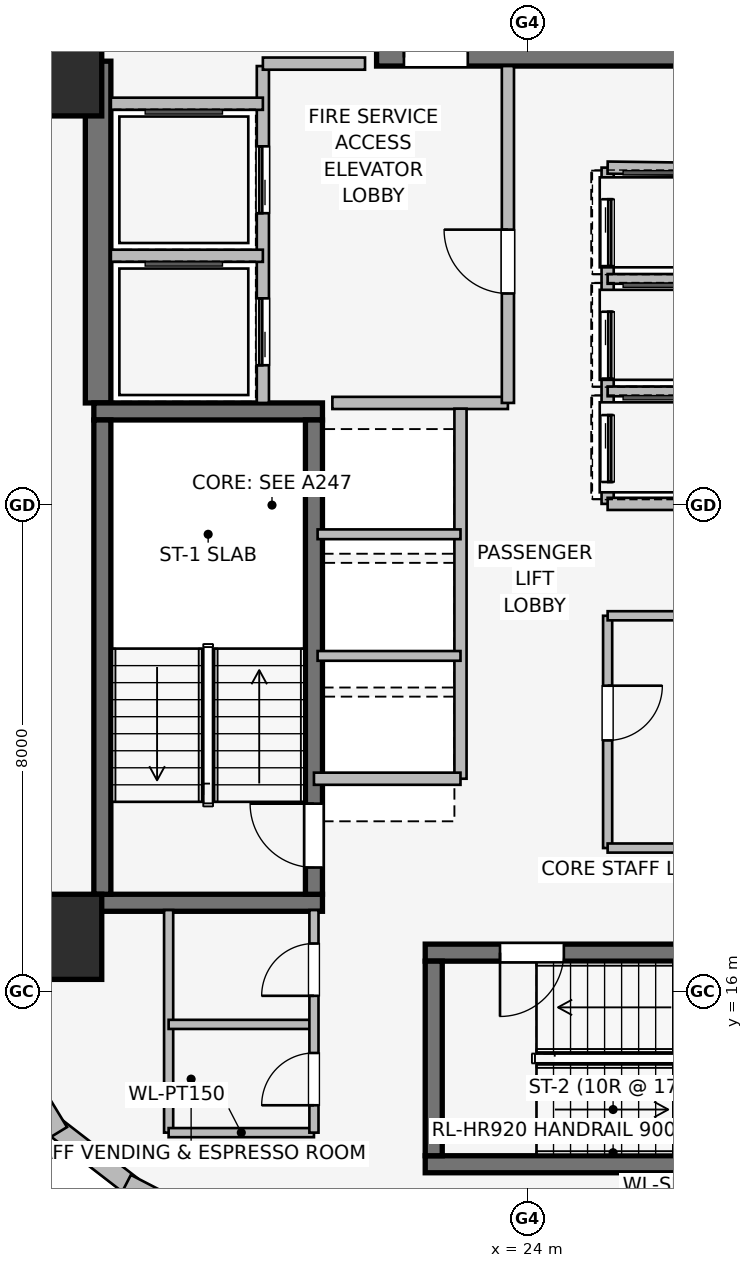
"""IFC4 building model, lengths in metres.
Left out: names, types, materials, properties, quantities, classifications, styles, units other than length and angle.
Written with IfcOpenShell. Run it as: python <this file> out.ifc"""

import sys

from ifc_helpers import new_model, si_unit, direction, frame, frame_2d, origin, origin_2d, place, context, subcontext, project, spatial, rectangle, extrude, element, fill, save


model = new_model("IFC4")
c1 = context("Model", 3, precision=1e-05, world=origin(), true_north=direction((0.0, 1.0)))
c2 = subcontext(c1, "Body", "Model", "MODEL_VIEW")
j1 = project(units=[si_unit("LENGTHUNIT", "METRE"), si_unit("PLANEANGLEUNIT", "RADIAN")], contexts=[c1])
p1 = place(None, origin())
s1 = spatial("IfcSite", under=j1, at=p1, CompositionType="ELEMENT")
p2 = place(p1, origin())
s2 = spatial("IfcBuilding", under=s1, at=p2, CompositionType="ELEMENT")
p3 = place(p2, frame((0.0, 0.0, 167.1)))
s3 = spatial("IfcBuildingStorey", under=s2, at=p3, CompositionType="ELEMENT", Elevation=167.1)
p4 = place(p3, frame((16.94, 25.68, 0.0), z_axis=(0.0, 0.0, 1.0), x_axis=(0.0, 1.0, 0.0)))
e1 = element("IfcWall", 1, at=p4, inside=s3, PredefinedType="SHEAR", context=c2, shape_type="SweptSolid", body=[
    extrude(rectangle(XDim=5.62, YDim=0.42, at=frame_2d((2.81, 0.0))), origin(), (0.0, 0.0, 1.0), 3.45),
])
for number, where, z_axis, x_axis in (
    (2, (16.87, 17.46, 0.0), (0.0, 0.0, 1.0), (1.0, 0.0, 0.0)),
    (3, (20.63, 25.54, 0.0), (0.0, 0.0, 1.0), (-1.0, 0.0, 0.0)),
):
    element("IfcWall", number, at=place(p3, frame(where, z_axis=z_axis, x_axis=x_axis)), inside=s3, PredefinedType="SHEAR", context=c2, shape_type="SweptSolid", body=[
        extrude(rectangle(XDim=3.76, YDim=0.28, at=frame_2d((1.88, 0.0))), origin(), (0.0, 0.0, 1.0), 3.45),
    ])
p5 = place(p3, frame((17.01, 25.4, 0.0), z_axis=(0.0, 0.0, 1.0), x_axis=(0.0, -1.0, 0.0)))
e4 = element("IfcWall", 4, at=p5, inside=s3, PredefinedType="SHEAR", context=c2, shape_type="SweptSolid", body=[
    extrude(rectangle(XDim=7.8, YDim=0.28, at=frame_2d((3.9, 0.0))), origin(), (0.0, 0.0, 1.0), 3.45),
])
p6 = place(p3, frame((20.49, 17.6, 0.0), z_axis=(0.0, 0.0, 1.0), x_axis=(0.0, 1.0, 0.0)))
e5 = element("IfcWall", 5, at=p6, inside=s3, PredefinedType="SHEAR", context=c2, shape_type="SweptSolid", body=[
    extrude(rectangle(XDim=7.8, YDim=0.28, at=frame_2d((3.9, 0.0))), origin(), (0.0, 0.0, 1.0), 3.45),
])
p7 = place(p6, frame((0.44, 0.0, 0.0)))
e6 = element("IfcOpeningElement", 6, at=p7, cuts=e5, PredefinedType="OPENING", context=c2, shape_type="SweptSolid", body=[
    extrude(rectangle(XDim=1.05, YDim=2.0, at=frame_2d((0.525, 1.0))), frame((0.0, 0.15, 0.0), z_axis=(0.0, -1.0, 0.0), x_axis=(1.0, 0.0, 0.0)), (0.0, 0.0, 1.0), 0.3),
])
p8 = place(p3, frame((22.32, 13.16, 0.0), z_axis=(0.0, 0.0, 1.0), x_axis=(1.0, 0.0, 0.0)))
e7 = element("IfcWall", 7, at=p8, inside=s3, PredefinedType="SHEAR", context=c2, shape_type="SweptSolid", body=[
    extrude(rectangle(XDim=8.36, YDim=0.28, at=frame_2d((4.18, 0.0))), origin(), (0.0, 0.0, 1.0), 3.45),
])
p9 = place(p3, frame((30.68, 16.64, 0.0), z_axis=(0.0, 0.0, 1.0), x_axis=(-1.0, 0.0, 0.0)))
e8 = element("IfcWall", 8, at=p9, inside=s3, PredefinedType="SHEAR", context=c2, shape_type="SweptSolid", body=[
    extrude(rectangle(XDim=8.36, YDim=0.28, at=frame_2d((4.18, 0.0))), origin(), (0.0, 0.0, 1.0), 3.45),
])
p10 = place(p9, frame((6.08, 0.0, 0.0)))
e9 = element("IfcOpeningElement", 9, at=p10, cuts=e8, PredefinedType="OPENING", context=c2, shape_type="SweptSolid", body=[
    extrude(rectangle(XDim=1.05, YDim=2.0, at=frame_2d((0.525, 1.0))), frame((0.0, 0.15, 0.0), z_axis=(0.0, -1.0, 0.0), x_axis=(1.0, 0.0, 0.0)), (0.0, 0.0, 1.0), 0.3),
])
p11 = place(p3, frame((22.46, 16.5, 0.0), z_axis=(0.0, 0.0, 1.0), x_axis=(0.0, -1.0, 0.0)))
e10 = element("IfcWall", 10, at=p11, inside=s3, PredefinedType="SHEAR", context=c2, shape_type="SweptSolid", body=[
    extrude(rectangle(XDim=3.2, YDim=0.28, at=frame_2d((1.6, 0.0))), origin(), (0.0, 0.0, 1.0), 3.45),
])
p12 = place(p3, frame((21.52, 31.36, 0.0), z_axis=(0.0, 0.0, 1.0), x_axis=(1.0, 0.0, 0.0)))
e11 = element("IfcWall", 11, at=p12, inside=s3, PredefinedType="SHEAR", context=c2, shape_type="SweptSolid", body=[
    extrude(rectangle(XDim=8.36, YDim=0.28, at=frame_2d((4.18, 0.0))), origin(), (0.0, 0.0, 1.0), 3.45),
])
p13 = place(p12, frame((0.45, 0.0, 0.0)))
e12 = element("IfcOpeningElement", 12, at=p13, cuts=e11, PredefinedType="OPENING", context=c2, shape_type="SweptSolid", body=[
    extrude(rectangle(XDim=1.05, YDim=2.0, at=frame_2d((0.525, 1.0))), frame((0.0, 0.15, 0.0), z_axis=(0.0, -1.0, 0.0), x_axis=(1.0, 0.0, 0.0)), (0.0, 0.0, 1.0), 0.3),
])
for number, where, z_axis, x_axis in (
    (13, (16.3, 16.9, 0.0), (0.0, 0.0, 1.0), (1.0, 0.0, 0.0)),
    (14, (16.3, 31.1, 0.0), (0.0, 0.0, 1.0), (1.0, 0.0, 0.0)),
):
    element("IfcColumn", number, at=place(p3, frame(where, z_axis=z_axis, x_axis=x_axis)), inside=s3, PredefinedType="COLUMN", context=c2, shape_type="SweptSolid", body=[
        extrude(rectangle(XDim=1.4, YDim=1.4, at=origin_2d()), origin(), (0.0, 0.0, 1.0), 3.45),
    ])
p14 = place(p3, frame((17.489, 12.8, 0.0), z_axis=(0.0, 0.0, 1.0), x_axis=(-0.791409877269, 0.611285862884, 0.0)))
e15 = element("IfcWall", 15, at=p14, inside=s3, PredefinedType="STANDARD", context=c2, shape_type="SweptSolid", body=[
    extrude(rectangle(XDim=1.677, YDim=0.33, at=frame_2d((0.838, 0.0))), origin(), (0.0, 0.0, 1.0), 3.19),
])
p15 = place(p3, frame((16.288, 13.685, 0.0), z_axis=(0.0, 0.0, 1.0), x_axis=(-0.520325409202, 0.853968072318, 0.0)))
e16 = element("IfcWall", 16, at=p15, inside=s3, PredefinedType="STANDARD", context=c2, shape_type="SweptSolid", body=[
    extrude(rectangle(XDim=1.678, YDim=0.33, at=frame_2d((0.839, 0.0))), origin(), (0.0, 0.0, 1.0), 3.19),
])
p16 = place(p3, frame((32.362, 5.129, 0.0), z_axis=(0.0, 0.0, 1.0), x_axis=(-0.888626188278, 0.458632202867, 0.0)))
e17 = element("IfcWall", 17, at=p16, inside=s3, PredefinedType="STANDARD", context=c2, shape_type="SweptSolid", body=[
    extrude(rectangle(XDim=16.828, YDim=0.31, at=frame_2d((8.414, 0.0))), origin(), (0.0, 0.0, 1.0), 3.19),
])
p17 = place(p16, frame((1.137, 0.0, 0.75)))
e18 = element("IfcOpeningElement", 18, at=p17, cuts=e17, PredefinedType="OPENING", context=c2, shape_type="SweptSolid", body=[
    extrude(rectangle(XDim=1.05, YDim=1.4, at=frame_2d((0.525, 0.7))), frame((0.0, 0.165, 0.0), z_axis=(0.0, -1.0, 0.0), x_axis=(1.0, 0.0, 0.0)), (0.0, 0.0, 1.0), 0.33),
])
p18 = place(p16, frame((4.768, 0.0, 0.75)))
e19 = element("IfcOpeningElement", 19, at=p18, cuts=e17, PredefinedType="OPENING", context=c2, shape_type="SweptSolid", body=[
    extrude(rectangle(XDim=1.35, YDim=1.45, at=frame_2d((0.675, 0.725))), frame((0.0, 0.165, 0.0), z_axis=(0.0, -1.0, 0.0), x_axis=(1.0, 0.0, 0.0)), (0.0, 0.0, 1.0), 0.33),
])
p19 = place(p16, frame((7.739, 0.0, 0.75)))
e20 = element("IfcOpeningElement", 20, at=p19, cuts=e17, PredefinedType="OPENING", context=c2, shape_type="SweptSolid", body=[
    extrude(rectangle(XDim=1.35, YDim=1.45, at=frame_2d((0.675, 0.725))), frame((0.0, 0.165, 0.0), z_axis=(0.0, -1.0, 0.0), x_axis=(1.0, 0.0, 0.0)), (0.0, 0.0, 1.0), 0.33),
])
p20 = place(p16, frame((10.71, 0.0, 0.75)))
e21 = element("IfcOpeningElement", 21, at=p20, cuts=e17, PredefinedType="OPENING", context=c2, shape_type="SweptSolid", body=[
    extrude(rectangle(XDim=1.35, YDim=1.45, at=frame_2d((0.675, 0.725))), frame((0.0, 0.165, 0.0), z_axis=(0.0, -1.0, 0.0), x_axis=(1.0, 0.0, 0.0)), (0.0, 0.0, 1.0), 0.33),
])
p21 = place(p16, frame((14.885, 0.0, 0.75)))
e22 = element("IfcOpeningElement", 22, at=p21, cuts=e17, PredefinedType="OPENING", context=c2, shape_type="SweptSolid", body=[
    extrude(rectangle(XDim=1.05, YDim=1.4, at=frame_2d((0.525, 0.7))), frame((0.0, 0.165, 0.0), z_axis=(0.0, -1.0, 0.0), x_axis=(1.0, 0.0, 0.0)), (0.0, 0.0, 1.0), 0.33),
])
p22 = place(p3, frame((19.65, 25.68, 0.0), z_axis=(0.0, 0.0, 1.0), x_axis=(0.0, 1.0, 0.0)))
e23 = element("IfcWall", 23, at=p22, inside=s3, PredefinedType="PARTITIONING", context=c2, shape_type="SweptSolid", body=[
    extrude(rectangle(XDim=5.54, YDim=0.2, at=frame_2d((2.77, 0.0))), origin(), (0.0, 0.0, 1.0), 3.19),
])
p23 = place(p22, frame((0.62, 0.0, 0.0)))
e24 = element("IfcOpeningElement", 24, at=p23, cuts=e23, PredefinedType="OPENING", context=c2, shape_type="SweptSolid", body=[
    extrude(rectangle(XDim=1.1, YDim=2.2, at=frame_2d((0.55, 1.1))), frame((0.0, 0.11, 0.0), z_axis=(0.0, -1.0, 0.0), x_axis=(1.0, 0.0, 0.0)), (0.0, 0.0, 1.0), 0.22),
])
p24 = place(p22, frame((3.12, 0.0, 0.0)))
e25 = element("IfcOpeningElement", 25, at=p24, cuts=e23, PredefinedType="OPENING", context=c2, shape_type="SweptSolid", body=[
    extrude(rectangle(XDim=1.1, YDim=2.2, at=frame_2d((0.55, 1.1))), frame((0.0, 0.11, 0.0), z_axis=(0.0, -1.0, 0.0), x_axis=(1.0, 0.0, 0.0)), (0.0, 0.0, 1.0), 0.22),
])
p25 = place(p3, frame((20.793, 25.68, 0.0), z_axis=(0.0, 0.0, 1.0), x_axis=(1.0, 0.0, 0.0)))
e26 = element("IfcWall", 26, at=p25, inside=s3, PredefinedType="PARTITIONING", context=c2, shape_type="SweptSolid", body=[
    extrude(rectangle(XDim=2.887, YDim=0.2, at=frame_2d((1.443, 0.0))), origin(), (0.0, 0.0, 1.0), 3.19),
])
p26 = place(p3, frame((23.68, 25.68, 0.0), z_axis=(0.0, 0.0, 1.0), x_axis=(0.0, 1.0, 0.0)))
e27 = element("IfcWall", 27, at=p26, inside=s3, PredefinedType="PARTITIONING", context=c2, shape_type="SweptSolid", body=[
    extrude(rectangle(XDim=5.54, YDim=0.2, at=frame_2d((2.77, 0.0))), origin(), (0.0, 0.0, 1.0), 3.19),
])
p27 = place(p26, frame((1.8, 0.0, 0.0)))
e28 = element("IfcOpeningElement", 28, at=p27, cuts=e27, PredefinedType="OPENING", context=c2, shape_type="SweptSolid", body=[
    extrude(rectangle(XDim=1.05, YDim=2.0, at=frame_2d((0.525, 1.0))), frame((0.0, 0.11, 0.0), z_axis=(0.0, -1.0, 0.0), x_axis=(1.0, 0.0, 0.0)), (0.0, 0.0, 1.0), 0.22),
])
p28 = place(p3, frame((21.33, 31.26, 0.0), z_axis=(0.0, 0.0, 1.0), x_axis=(-1.0, 0.0, 0.0)))
e29 = element("IfcWall", 29, at=p28, inside=s3, PredefinedType="PARTITIONING", context=c2, shape_type="SweptSolid", body=[
    extrude(rectangle(XDim=1.68, YDim=0.2, at=frame_2d((0.84, 0.0))), origin(), (0.0, 0.0, 1.0), 3.19),
])
p29 = place(p3, frame((17.15, 28.1, 0.0), z_axis=(0.0, 0.0, 1.0), x_axis=(1.0, 0.0, 0.0)))
e30 = element("IfcWall", 30, at=p29, inside=s3, PredefinedType="PARTITIONING", context=c2, shape_type="SweptSolid", body=[
    extrude(rectangle(XDim=2.5, YDim=0.2, at=frame_2d((1.25, 0.0))), origin(), (0.0, 0.0, 1.0), 3.19),
])
p30 = place(p3, frame((19.65, 30.6, 0.0), z_axis=(0.0, 0.0, 1.0), x_axis=(-1.0, 0.0, 0.0)))
e31 = element("IfcWall", 31, at=p30, inside=s3, PredefinedType="PARTITIONING", context=c2, shape_type="SweptSolid", body=[
    extrude(rectangle(XDim=2.5, YDim=0.2, at=frame_2d((1.25, 0.0))), origin(), (0.0, 0.0, 1.0), 2.09),
])
p31 = place(p3, frame((22.9, 19.5, 0.0), z_axis=(0.0, 0.0, 1.0), x_axis=(0.0, 1.0, 0.0)))
e32 = element("IfcWall", 32, at=p31, inside=s3, PredefinedType="PARTITIONING", context=c2, shape_type="SweptSolid", body=[
    extrude(rectangle(XDim=6.085, YDim=0.2, at=frame_2d((3.042, 0.0))), origin(), (0.0, 0.0, 1.0), 3.19),
])
p32 = place(p3, frame((20.49, 19.5, 0.0), z_axis=(0.0, 0.0, 1.0), x_axis=(1.0, 0.0, 0.0)))
e33 = element("IfcWall", 33, at=p32, inside=s3, PredefinedType="PARTITIONING", context=c2, shape_type="SweptSolid", body=[
    extrude(rectangle(XDim=2.41, YDim=0.2, at=frame_2d((1.205, 0.0))), origin(), (0.0, 0.0, 1.0), 2.09),
])
for number, where, z_axis, x_axis in (
    (34, (20.55, 21.52, 0.0), (0.0, 0.0, 1.0), (1.0, 0.0, 0.0)),
    (35, (20.55, 23.52, 0.0), (0.0, 0.0, 1.0), (1.0, 0.0, 0.0)),
):
    element("IfcWall", number, at=place(p3, frame(where, z_axis=z_axis, x_axis=x_axis)), inside=s3, PredefinedType="PARTITIONING", context=c2, shape_type="SweptSolid", body=[
        extrude(rectangle(XDim=2.35, YDim=0.16, at=frame_2d((1.175, 0.0))), origin(), (0.0, 0.0, 1.0), 3.19),
    ])
p33 = place(p3, frame((25.32, 29.55, 0.0), z_axis=(0.0, 0.0, 1.0), x_axis=(0.0, -1.0, 0.0)))
e36 = element("IfcWall", 36, at=p33, inside=s3, PredefinedType="PARTITIONING", context=c2, shape_type="SweptSolid", body=[
    extrude(rectangle(XDim=5.53, YDim=0.2, at=frame_2d((2.765, 0.0))), origin(), (0.0, 0.0, 1.0), 3.19),
])
p34 = place(p33, frame((0.52, 0.0, 0.0)))
e37 = element("IfcOpeningElement", 37, at=p34, cuts=e36, PredefinedType="OPENING", context=c2, shape_type="SweptSolid", body=[
    extrude(rectangle(XDim=1.1, YDim=2.2, at=frame_2d((0.55, 1.1))), frame((0.0, 0.11, 0.0), z_axis=(0.0, -1.0, 0.0), x_axis=(1.0, 0.0, 0.0)), (0.0, 0.0, 1.0), 0.22),
])
p35 = place(p33, frame((2.37, 0.0, 0.0)))
e38 = element("IfcOpeningElement", 38, at=p35, cuts=e36, PredefinedType="OPENING", context=c2, shape_type="SweptSolid", body=[
    extrude(rectangle(XDim=1.1, YDim=2.2, at=frame_2d((0.55, 1.1))), frame((0.0, 0.11, 0.0), z_axis=(0.0, -1.0, 0.0), x_axis=(1.0, 0.0, 0.0)), (0.0, 0.0, 1.0), 0.22),
])
p36 = place(p33, frame((4.07, 0.0, 0.0)))
e39 = element("IfcOpeningElement", 39, at=p36, cuts=e36, PredefinedType="OPENING", context=c2, shape_type="SweptSolid", body=[
    extrude(rectangle(XDim=1.1, YDim=2.2, at=frame_2d((0.55, 1.1))), frame((0.0, 0.11, 0.0), z_axis=(0.0, -1.0, 0.0), x_axis=(1.0, 0.0, 0.0)), (0.0, 0.0, 1.0), 0.22),
])
p37 = place(p3, frame((27.55, 29.52, 0.0), z_axis=(0.0, 0.0, 1.0), x_axis=(-0.999909343457, 0.013464949556, 0.0)))
e40 = element("IfcWall", 40, at=p37, inside=s3, PredefinedType="PARTITIONING", context=c2, shape_type="SweptSolid", body=[
    extrude(rectangle(XDim=2.23, YDim=0.2, at=frame_2d((1.115, 0.0))), origin(), (0.0, 0.0, 1.0), 2.09),
])
p38 = place(p3, frame((25.32, 24.02, 0.0), z_axis=(0.0, 0.0, 1.0), x_axis=(1.0, 0.0, 0.0)))
e41 = element("IfcWall", 41, at=p38, inside=s3, PredefinedType="PARTITIONING", context=c2, shape_type="SweptSolid", body=[
    extrude(rectangle(XDim=2.23, YDim=0.2, at=frame_2d((1.115, 0.0))), origin(), (0.0, 0.0, 1.0), 3.19),
])
for number, where, z_axis, x_axis in (
    (42, (25.32, 25.87, 0.0), (0.0, 0.0, 1.0), (1.0, 0.0, 0.0)),
    (43, (25.32, 27.72, 0.0), (0.0, 0.0, 1.0), (1.0, 0.0, 0.0)),
):
    element("IfcWall", number, at=place(p3, frame(where, z_axis=z_axis, x_axis=x_axis)), inside=s3, PredefinedType="PARTITIONING", context=c2, shape_type="SweptSolid", body=[
        extrude(rectangle(XDim=2.03, YDim=0.16, at=frame_2d((1.015, 0.0))), origin(), (0.0, 0.0, 1.0), 3.19),
    ])
p39 = place(p3, frame((25.32, 22.18, 0.0), z_axis=(0.0, 0.0, 1.0), x_axis=(0.0, -1.0, 0.0)))
e44 = element("IfcWall", 44, at=p39, inside=s3, PredefinedType="PARTITIONING", context=c2, shape_type="SweptSolid", body=[
    extrude(rectangle(XDim=3.82, YDim=0.15, at=frame_2d((1.91, 0.0))), origin(), (0.0, 0.0, 1.0), 3.19),
])
p40 = place(p39, frame((1.15, 0.0, 0.0)))
e45 = element("IfcOpeningElement", 45, at=p40, cuts=e44, PredefinedType="OPENING", context=c2, shape_type="SweptSolid", body=[
    extrude(rectangle(XDim=0.9, YDim=2.0, at=frame_2d((0.45, 1.0))), frame((0.0, 0.085, 0.0), z_axis=(0.0, -1.0, 0.0), x_axis=(1.0, 0.0, 0.0)), (0.0, 0.0, 1.0), 0.17),
])
for number, where, z_axis, x_axis in (
    (46, (25.32, 22.18, 0.0), (0.0, 0.0, 1.0), (1.0, 0.0, 0.0)),
    (47, (25.32, 18.36, 0.0), (0.0, 0.0, 1.0), (1.0, 0.0, 0.0)),
):
    element("IfcWall", number, at=place(p3, frame(where, z_axis=z_axis, x_axis=x_axis)), inside=s3, PredefinedType="PARTITIONING", context=c2, shape_type="SweptSolid", body=[
        extrude(rectangle(XDim=2.23, YDim=0.15, at=frame_2d((1.115, 0.0))), origin(), (0.0, 0.0, 1.0), 3.19),
    ])
p41 = place(p3, frame((18.1, 17.34, 0.0), z_axis=(0.0, 0.0, 1.0), x_axis=(0.0, -1.0, 0.0)))
e48 = element("IfcWall", 48, at=p41, inside=s3, PredefinedType="PARTITIONING", context=c2, shape_type="SweptSolid", body=[
    extrude(rectangle(XDim=3.66, YDim=0.15, at=frame_2d((1.83, 0.0))), origin(), (0.0, 0.0, 1.0), 3.19),
])
for number, where, z_axis, x_axis in (
    (49, (18.1, 13.68, 0.0), (0.0, 0.0, 1.0), (1.0, 0.0, 0.0)),
    (50, (18.1, 15.46, 0.0), (0.0, 0.0, 1.0), (1.0, 0.0, 0.0)),
):
    element("IfcWall", number, at=place(p3, frame(where, z_axis=z_axis, x_axis=x_axis)), inside=s3, PredefinedType="PARTITIONING", context=c2, shape_type="SweptSolid", body=[
        extrude(rectangle(XDim=2.39, YDim=0.15, at=frame_2d((1.195, 0.0))), origin(), (0.0, 0.0, 1.0), 3.19),
    ])
p42 = place(p3, frame((20.49, 13.68, 0.0), z_axis=(0.0, 0.0, 1.0), x_axis=(0.0, 1.0, 0.0)))
e51 = element("IfcWall", 51, at=p42, inside=s3, PredefinedType="PARTITIONING", context=c2, shape_type="SweptSolid", body=[
    extrude(rectangle(XDim=3.66, YDim=0.15, at=frame_2d((1.83, 0.0))), origin(), (0.0, 0.0, 1.0), 3.19),
])
p43 = place(p42, frame((0.45, 0.0, 0.0)))
e52 = element("IfcOpeningElement", 52, at=p43, cuts=e51, PredefinedType="OPENING", context=c2, shape_type="SweptSolid", body=[
    extrude(rectangle(XDim=0.86, YDim=2.0, at=frame_2d((0.43, 1.0))), frame((0.0, 0.085, 0.0), z_axis=(0.0, -1.0, 0.0), x_axis=(1.0, 0.0, 0.0)), (0.0, 0.0, 1.0), 0.17),
])
p44 = place(p42, frame((2.25, 0.0, 0.0)))
e53 = element("IfcOpeningElement", 53, at=p44, cuts=e51, PredefinedType="OPENING", context=c2, shape_type="SweptSolid", body=[
    extrude(rectangle(XDim=0.86, YDim=2.0, at=frame_2d((0.43, 1.0))), frame((0.0, 0.085, 0.0), z_axis=(0.0, -1.0, 0.0), x_axis=(1.0, 0.0, 0.0)), (0.0, 0.0, 1.0), 0.17),
])
p45 = place(p7, origin())
e54 = element("IfcDoor", 54, at=p45, inside=s3, OperationType="SINGLE_SWING_RIGHT", PredefinedType="DOOR", context=c2, shape_type="SweptSolid", body=[
    extrude(rectangle(XDim=1.05, YDim=2.0, at=frame_2d((0.525, 1.0))), frame((0.0, 0.025, 0.0), z_axis=(0.0, -1.0, 0.0), x_axis=(1.0, 0.0, 0.0)), (0.0, 0.0, 1.0), 0.05),
])
fill(e6, e54)
p46 = place(p10, origin())
e55 = element("IfcDoor", 55, at=p46, inside=s3, OperationType="SINGLE_SWING_RIGHT", PredefinedType="DOOR", context=c2, shape_type="SweptSolid", body=[
    extrude(rectangle(XDim=1.05, YDim=2.0, at=frame_2d((0.525, 1.0))), frame((0.0, 0.025, 0.0), z_axis=(0.0, -1.0, 0.0), x_axis=(1.0, 0.0, 0.0)), (0.0, 0.0, 1.0), 0.05),
])
fill(e9, e55)
p47 = place(p13, origin())
e56 = element("IfcDoor", 56, at=p47, inside=s3, OperationType="SINGLE_SWING_LEFT", PredefinedType="DOOR", context=c2, shape_type="SweptSolid", body=[
    extrude(rectangle(XDim=1.05, YDim=2.0, at=frame_2d((0.525, 1.0))), frame((0.0, 0.025, 0.0), z_axis=(0.0, -1.0, 0.0), x_axis=(1.0, 0.0, 0.0)), (0.0, 0.0, 1.0), 0.05),
])
fill(e12, e56)
p48 = place(p23, origin())
e57 = element("IfcDoor", 57, at=p48, inside=s3, OperationType="SLIDING_TO_LEFT", PredefinedType="DOOR", context=c2, shape_type="SweptSolid", body=[
    extrude(rectangle(XDim=1.1, YDim=2.2, at=frame_2d((0.55, 1.1))), frame((0.0, 0.025, 0.0), z_axis=(0.0, -1.0, 0.0), x_axis=(1.0, 0.0, 0.0)), (0.0, 0.0, 1.0), 0.05),
])
fill(e24, e57)
p49 = place(p24, origin())
e58 = element("IfcDoor", 58, at=p49, inside=s3, OperationType="SLIDING_TO_LEFT", PredefinedType="DOOR", context=c2, shape_type="SweptSolid", body=[
    extrude(rectangle(XDim=1.1, YDim=2.2, at=frame_2d((0.55, 1.1))), frame((0.0, 0.025, 0.0), z_axis=(0.0, -1.0, 0.0), x_axis=(1.0, 0.0, 0.0)), (0.0, 0.0, 1.0), 0.05),
])
fill(e25, e58)
p50 = place(p27, origin())
e59 = element("IfcDoor", 59, at=p50, inside=s3, OperationType="SINGLE_SWING_RIGHT", PredefinedType="DOOR", context=c2, shape_type="SweptSolid", body=[
    extrude(rectangle(XDim=1.05, YDim=2.0, at=frame_2d((0.525, 1.0))), frame((0.0, 0.025, 0.0), z_axis=(0.0, -1.0, 0.0), x_axis=(1.0, 0.0, 0.0)), (0.0, 0.0, 1.0), 0.05),
])
fill(e28, e59)
p51 = place(p34, origin())
e60 = element("IfcDoor", 60, at=p51, inside=s3, OperationType="SLIDING_TO_LEFT", PredefinedType="DOOR", context=c2, shape_type="SweptSolid", body=[
    extrude(rectangle(XDim=1.1, YDim=2.2, at=frame_2d((0.55, 1.1))), frame((0.0, 0.025, 0.0), z_axis=(0.0, -1.0, 0.0), x_axis=(1.0, 0.0, 0.0)), (0.0, 0.0, 1.0), 0.05),
])
fill(e37, e60)
p52 = place(p35, origin())
e61 = element("IfcDoor", 61, at=p52, inside=s3, OperationType="SLIDING_TO_LEFT", PredefinedType="DOOR", context=c2, shape_type="SweptSolid", body=[
    extrude(rectangle(XDim=1.1, YDim=2.2, at=frame_2d((0.55, 1.1))), frame((0.0, 0.025, 0.0), z_axis=(0.0, -1.0, 0.0), x_axis=(1.0, 0.0, 0.0)), (0.0, 0.0, 1.0), 0.05),
])
fill(e38, e61)
p53 = place(p36, origin())
e62 = element("IfcDoor", 62, at=p53, inside=s3, OperationType="SLIDING_TO_LEFT", PredefinedType="DOOR", context=c2, shape_type="SweptSolid", body=[
    extrude(rectangle(XDim=1.1, YDim=2.2, at=frame_2d((0.55, 1.1))), frame((0.0, 0.025, 0.0), z_axis=(0.0, -1.0, 0.0), x_axis=(1.0, 0.0, 0.0)), (0.0, 0.0, 1.0), 0.05),
])
fill(e39, e62)
p54 = place(p40, origin())
e63 = element("IfcDoor", 63, at=p54, inside=s3, OperationType="SINGLE_SWING_LEFT", PredefinedType="DOOR", context=c2, shape_type="SweptSolid", body=[
    extrude(rectangle(XDim=0.9, YDim=2.0, at=frame_2d((0.45, 1.0))), frame((0.0, 0.025, 0.0), z_axis=(0.0, -1.0, 0.0), x_axis=(1.0, 0.0, 0.0)), (0.0, 0.0, 1.0), 0.05),
])
fill(e45, e63)
p55 = place(p43, origin())
e64 = element("IfcDoor", 64, at=p55, inside=s3, OperationType="SINGLE_SWING_LEFT", PredefinedType="DOOR", context=c2, shape_type="SweptSolid", body=[
    extrude(rectangle(XDim=0.86, YDim=2.0, at=frame_2d((0.43, 1.0))), frame((0.0, 0.025, 0.0), z_axis=(0.0, -1.0, 0.0), x_axis=(1.0, 0.0, 0.0)), (0.0, 0.0, 1.0), 0.05),
])
fill(e52, e64)
p56 = place(p44, origin())
e65 = element("IfcDoor", 65, at=p56, inside=s3, OperationType="SINGLE_SWING_LEFT", PredefinedType="DOOR", context=c2, shape_type="SweptSolid", body=[
    extrude(rectangle(XDim=0.86, YDim=2.0, at=frame_2d((0.43, 1.0))), frame((0.0, 0.025, 0.0), z_axis=(0.0, -1.0, 0.0), x_axis=(1.0, 0.0, 0.0)), (0.0, 0.0, 1.0), 0.05),
])
fill(e53, e65)
save(model, sys.argv[1])
